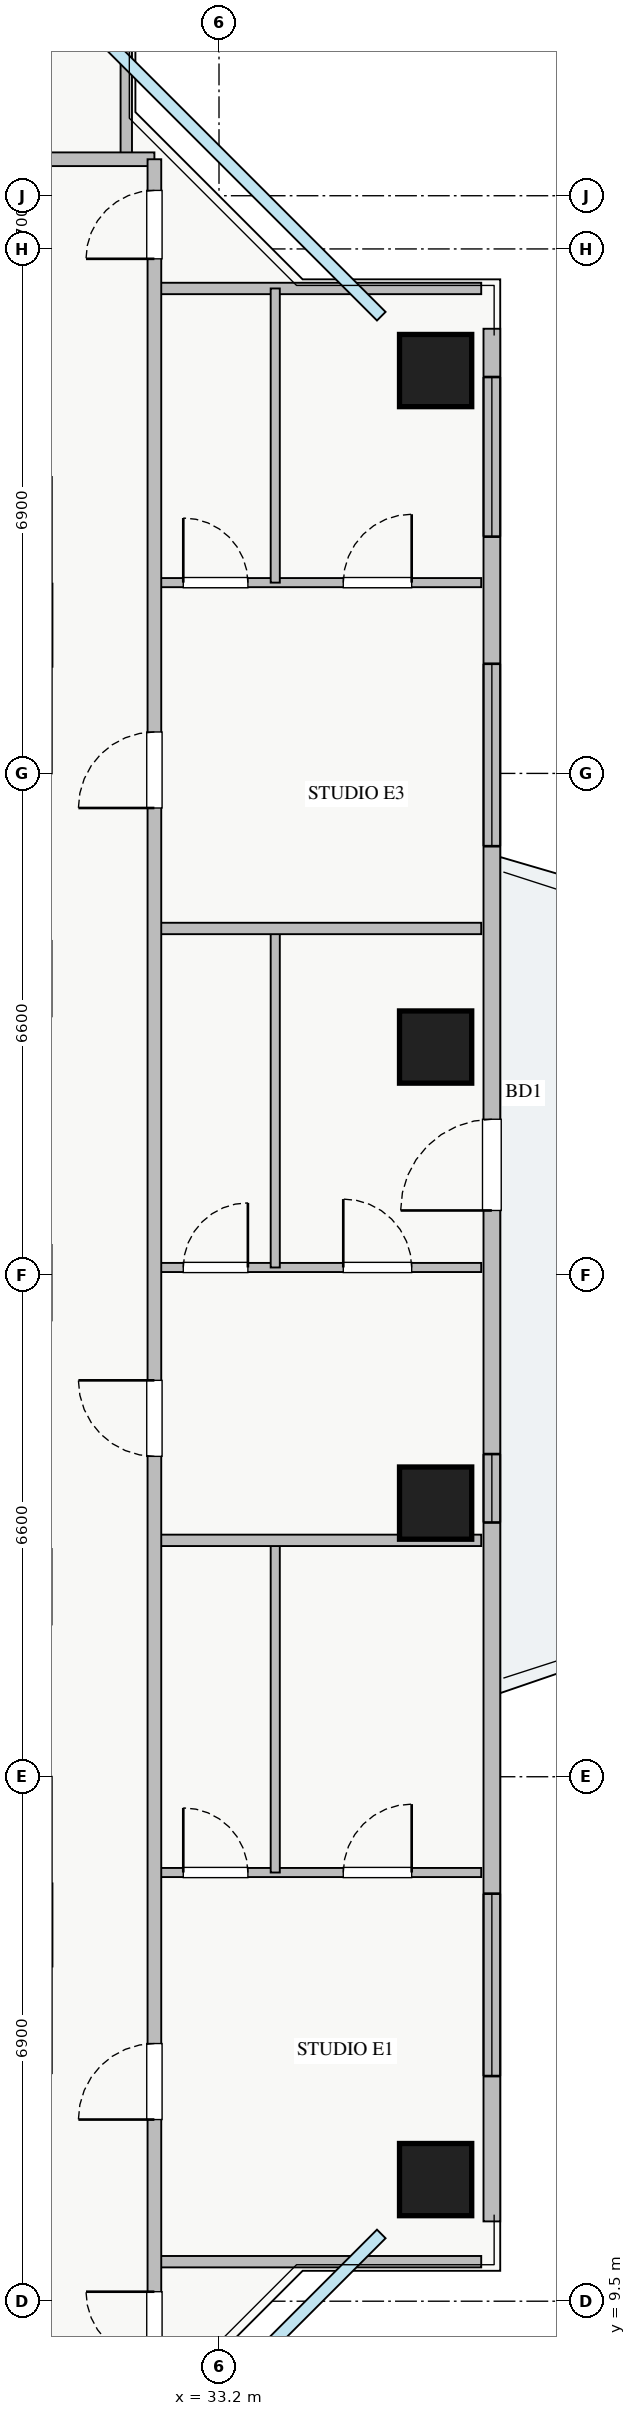
"""IFC4 building model, lengths in metres.
Left out: names, types, materials, properties, quantities, classifications, styles, units other than length and angle.
Written with IfcOpenShell. Run it as: python <this file> out.ifc"""

import sys

from ifc_helpers import new_model, si_unit, direction, frame, frame_2d, origin, origin_2d, place, context, subcontext, project, spatial, rectangle, extrude, source, transform, mapped, element, fill, save


model = new_model("IFC4")
c1 = context("Model", 3, precision=1e-05, world=origin(), true_north=direction((0.0, 1.0)))
c2 = subcontext(c1, "Body", "Model", "MODEL_VIEW")
j1 = project(units=[si_unit("LENGTHUNIT", "METRE"), si_unit("PLANEANGLEUNIT", "RADIAN")], contexts=[c1])
p1 = place(None, origin())
s1 = spatial("IfcSite", under=j1, at=p1, CompositionType="ELEMENT")
p2 = place(p1, origin())
s2 = spatial("IfcBuilding", under=s1, at=p2, CompositionType="ELEMENT")
p3 = place(p2, frame((0.0, 0.0, 182.75)))
s3 = spatial("IfcBuildingStorey", under=s2, at=p3, CompositionType="ELEMENT", Elevation=182.75)
m1 = source(origin(), c2, "Body", "SweptSolid", [
    extrude(rectangle(XDim=0.95, YDim=0.95, at=origin_2d()), origin(), (0.0, 0.0, 1.0), 3.25),
])
for number, where, z_axis, x_axis in (
    (1, (36.05, 11.1, 0.0), (0.0, 0.0, 1.0), (1.0, 0.0, 0.0)),
    (2, (36.05, 20.0, 0.0), (0.0, 0.0, 1.0), (1.0, 0.0, 0.0)),
    (3, (36.05, 26.0, 0.0), (0.0, 0.0, 1.0), (1.0, 0.0, 0.0)),
    (4, (36.05, 34.9, 0.0), (0.0, 0.0, 1.0), (1.0, 0.0, 0.0)),
):
    element("IfcColumn", number, at=place(p3, frame(where, z_axis=z_axis, x_axis=x_axis)), inside=s3, PredefinedType="COLUMN", context=c2, shape_type="MappedRepresentation", body=[
        mapped(m1, transform((0.0, 0.0, 0.0), x_axis=(1.0, 0.0, 0.0), y_axis=(0.0, 1.0, 0.0), z_axis=(0.0, 0.0, 1.0), scale=1.0)),
    ])
p4 = place(p3, frame((36.79, 10.55, 0.0), z_axis=(0.0, 0.0, 1.0), x_axis=(0.0, 1.0, 0.0)))
e5 = element("IfcWall", 5, at=p4, inside=s3, PredefinedType="STANDARD", context=c2, shape_type="SweptSolid", body=[
    extrude(rectangle(XDim=24.9, YDim=0.22, at=frame_2d((12.45, 0.0))), origin(), (0.0, 0.0, 1.0), 2.57),
])
p5 = place(p4, frame((13.3, 0.0, 0.0)))
e6 = element("IfcOpeningElement", 6, at=p5, cuts=e5, PredefinedType="OPENING", context=c2, shape_type="SweptSolid", body=[
    extrude(rectangle(XDim=1.2, YDim=2.1, at=frame_2d((0.6, 1.05))), frame((0.0, 0.12, 0.0), z_axis=(0.0, -1.0, 0.0), x_axis=(1.0, 0.0, 0.0)), (0.0, 0.0, 1.0), 0.24),
])
p6 = place(p4, frame((1.912, 0.0, 0.9)))
e7 = element("IfcOpeningElement", 7, at=p6, cuts=e5, PredefinedType="OPENING", context=c2, shape_type="SweptSolid", body=[
    extrude(rectangle(XDim=2.4, YDim=1.48, at=frame_2d((1.2, 0.74))), frame((0.0, 0.12, 0.0), z_axis=(0.0, -1.0, 0.0), x_axis=(1.0, 0.0, 0.0)), (0.0, 0.0, 1.0), 0.24),
])
p7 = place(p4, frame((22.165, 0.0, 0.9)))
e8 = element("IfcOpeningElement", 8, at=p7, cuts=e5, PredefinedType="OPENING", context=c2, shape_type="SweptSolid", body=[
    extrude(rectangle(XDim=2.1, YDim=1.5, at=frame_2d((1.05, 0.75))), frame((0.0, 0.12, 0.0), z_axis=(0.0, -1.0, 0.0), x_axis=(1.0, 0.0, 0.0)), (0.0, 0.0, 1.0), 0.24),
])
p8 = place(p4, frame((18.093, 0.0, 0.9)))
e9 = element("IfcOpeningElement", 9, at=p8, cuts=e5, PredefinedType="OPENING", context=c2, shape_type="SweptSolid", body=[
    extrude(rectangle(XDim=2.4, YDim=1.5, at=frame_2d((1.2, 0.75))), frame((0.0, 0.12, 0.0), z_axis=(0.0, -1.0, 0.0), x_axis=(1.0, 0.0, 0.0)), (0.0, 0.0, 1.0), 0.24),
])
p9 = place(p4, frame((9.195, 0.0, 0.9)))
e10 = element("IfcOpeningElement", 10, at=p9, cuts=e5, PredefinedType="OPENING", context=c2, shape_type="SweptSolid", body=[
    extrude(rectangle(XDim=0.9, YDim=1.2, at=frame_2d((0.45, 0.6))), frame((0.0, 0.12, 0.0), z_axis=(0.0, -1.0, 0.0), x_axis=(1.0, 0.0, 0.0)), (0.0, 0.0, 1.0), 0.24),
])
p10 = place(p3, frame((31.98, 37.68, 0.0), z_axis=(0.0, 0.0, 1.0), x_axis=(0.0, 1.0, 0.0)))
e11 = element("IfcWall", 11, at=p10, inside=s3, PredefinedType="PARTITIONING", context=c2, shape_type="SweptSolid", body=[
    extrude(rectangle(XDim=2.97, YDim=0.15, at=frame_2d((1.485, 0.0))), origin(), (0.0, 0.0, 1.0), 3.03),
])
p11 = place(p3, frame((8.72, 37.68, 0.0), z_axis=(0.0, 0.0, 1.0), x_axis=(1.0, 0.0, 0.0)))
e12 = element("IfcWall", 12, at=p11, inside=s3, PredefinedType="PARTITIONING", context=c2, shape_type="SweptSolid", body=[
    extrude(rectangle(XDim=23.63, YDim=0.18, at=frame_2d((11.815, 0.0))), origin(), (0.0, 0.0, 1.0), 3.03),
])
p12 = place(p11, frame((2.83, 0.0, 0.0)))
e13 = element("IfcOpeningElement", 13, at=p12, cuts=e12, PredefinedType="OPENING", context=c2, shape_type="SweptSolid", body=[
    extrude(rectangle(XDim=1.0, YDim=2.05, at=frame_2d((0.5, 1.025))), frame((0.0, 0.1, 0.0), z_axis=(0.0, -1.0, 0.0), x_axis=(1.0, 0.0, 0.0)), (0.0, 0.0, 1.0), 0.2),
])
p13 = place(p11, frame((8.02, 0.0, 0.0)))
e14 = element("IfcOpeningElement", 14, at=p13, cuts=e12, PredefinedType="OPENING", context=c2, shape_type="SweptSolid", body=[
    extrude(rectangle(XDim=1.0, YDim=2.05, at=frame_2d((0.5, 1.025))), frame((0.0, 0.1, 0.0), z_axis=(0.0, -1.0, 0.0), x_axis=(1.0, 0.0, 0.0)), (0.0, 0.0, 1.0), 0.2),
])
p14 = place(p11, frame((13.41, 0.0, 0.0)))
e15 = element("IfcOpeningElement", 15, at=p14, cuts=e12, PredefinedType="OPENING", context=c2, shape_type="SweptSolid", body=[
    extrude(rectangle(XDim=1.0, YDim=2.05, at=frame_2d((0.5, 1.025))), frame((0.0, 0.1, 0.0), z_axis=(0.0, -1.0, 0.0), x_axis=(1.0, 0.0, 0.0)), (0.0, 0.0, 1.0), 0.2),
])
p15 = place(p11, frame((19.85, 0.0, 0.0)))
e16 = element("IfcOpeningElement", 16, at=p15, cuts=e12, PredefinedType="OPENING", context=c2, shape_type="SweptSolid", body=[
    extrude(rectangle(XDim=1.0, YDim=2.05, at=frame_2d((0.5, 1.025))), frame((0.0, 0.1, 0.0), z_axis=(0.0, -1.0, 0.0), x_axis=(1.0, 0.0, 0.0)), (0.0, 0.0, 1.0), 0.2),
])
for number, where, z_axis, x_axis in (
    (17, (32.35, 35.98, 0.0), (0.0, 0.0, 1.0), (1.0, 0.0, 0.0)),
    (18, (32.35, 10.02, 0.0), (0.0, 0.0, 1.0), (1.0, 0.0, 0.0)),
):
    element("IfcWall", number, at=place(p3, frame(where, z_axis=z_axis, x_axis=x_axis)), inside=s3, PredefinedType="PARTITIONING", context=c2, shape_type="SweptSolid", body=[
        extrude(rectangle(XDim=4.3, YDim=0.15, at=frame_2d((2.15, 0.0))), origin(), (0.0, 0.0, 1.0), 3.03),
    ])
p16 = place(p3, frame((32.35, 15.14, 0.0), z_axis=(0.0, 0.0, 1.0), x_axis=(1.0, 0.0, 0.0)))
e19 = element("IfcWall", 19, at=p16, inside=s3, PredefinedType="PLUMBINGWALL", context=c2, shape_type="SweptSolid", body=[
    extrude(rectangle(XDim=4.3, YDim=0.12, at=frame_2d((2.15, 0.0))), origin(), (0.0, 0.0, 1.0), 3.03),
])
p17 = place(p16, frame((0.38, 0.0, 0.0)))
e20 = element("IfcOpeningElement", 20, at=p17, cuts=e19, PredefinedType="OPENING", context=c2, shape_type="SweptSolid", body=[
    extrude(rectangle(XDim=0.85, YDim=2.05, at=frame_2d((0.425, 1.025))), frame((0.0, 0.07, 0.0), z_axis=(0.0, -1.0, 0.0), x_axis=(1.0, 0.0, 0.0)), (0.0, 0.0, 1.0), 0.14),
])
p18 = place(p16, frame((2.485, 0.0, 0.0)))
e21 = element("IfcOpeningElement", 21, at=p18, cuts=e19, PredefinedType="OPENING", context=c2, shape_type="SweptSolid", body=[
    extrude(rectangle(XDim=0.9, YDim=2.05, at=frame_2d((0.45, 1.025))), frame((0.0, 0.07, 0.0), z_axis=(0.0, -1.0, 0.0), x_axis=(1.0, 0.0, 0.0)), (0.0, 0.0, 1.0), 0.14),
])
p19 = place(p3, frame((33.94, 15.14, 0.0), z_axis=(0.0, 0.0, 1.0), x_axis=(0.0, 1.0, 0.0)))
e22 = element("IfcWall", 22, at=p19, inside=s3, PredefinedType="PLUMBINGWALL", context=c2, shape_type="SweptSolid", body=[
    extrude(rectangle(XDim=4.37, YDim=0.12, at=frame_2d((2.185, 0.0))), origin(), (0.0, 0.0, 1.0), 3.03),
])
p20 = place(p3, frame((32.35, 23.1, 0.0), z_axis=(0.0, 0.0, 1.0), x_axis=(1.0, 0.0, 0.0)))
e23 = element("IfcWall", 23, at=p20, inside=s3, PredefinedType="PLUMBINGWALL", context=c2, shape_type="SweptSolid", body=[
    extrude(rectangle(XDim=4.3, YDim=0.12, at=frame_2d((2.15, 0.0))), origin(), (0.0, 0.0, 1.0), 3.03),
])
p21 = place(p20, frame((0.38, 0.0, 0.0)))
e24 = element("IfcOpeningElement", 24, at=p21, cuts=e23, PredefinedType="OPENING", context=c2, shape_type="SweptSolid", body=[
    extrude(rectangle(XDim=0.85, YDim=2.05, at=frame_2d((0.425, 1.025))), frame((0.0, 0.07, 0.0), z_axis=(0.0, -1.0, 0.0), x_axis=(1.0, 0.0, 0.0)), (0.0, 0.0, 1.0), 0.14),
])
p22 = place(p20, frame((2.485, 0.0, 0.0)))
e25 = element("IfcOpeningElement", 25, at=p22, cuts=e23, PredefinedType="OPENING", context=c2, shape_type="SweptSolid", body=[
    extrude(rectangle(XDim=0.9, YDim=2.05, at=frame_2d((0.45, 1.025))), frame((0.0, 0.07, 0.0), z_axis=(0.0, -1.0, 0.0), x_axis=(1.0, 0.0, 0.0)), (0.0, 0.0, 1.0), 0.14),
])
p23 = place(p3, frame((33.94, 23.1, 0.0), z_axis=(0.0, 0.0, 1.0), x_axis=(0.0, 1.0, 0.0)))
e26 = element("IfcWall", 26, at=p23, inside=s3, PredefinedType="PLUMBINGWALL", context=c2, shape_type="SweptSolid", body=[
    extrude(rectangle(XDim=4.46, YDim=0.12, at=frame_2d((2.23, 0.0))), origin(), (0.0, 0.0, 1.0), 3.03),
])
p24 = place(p3, frame((32.35, 19.51, 0.0), z_axis=(0.0, 0.0, 1.0), x_axis=(1.0, 0.0, 0.0)))
e27 = element("IfcWall", 27, at=p24, inside=s3, PredefinedType="PARTITIONING", context=c2, shape_type="SweptSolid", body=[
    extrude(rectangle(XDim=4.3, YDim=0.15, at=frame_2d((2.15, 0.0))), origin(), (0.0, 0.0, 1.0), 3.03),
])
p25 = place(p3, frame((32.35, 32.11, 0.0), z_axis=(0.0, 0.0, 1.0), x_axis=(1.0, 0.0, 0.0)))
e28 = element("IfcWall", 28, at=p25, inside=s3, PredefinedType="PLUMBINGWALL", context=c2, shape_type="SweptSolid", body=[
    extrude(rectangle(XDim=4.3, YDim=0.12, at=frame_2d((2.15, 0.0))), origin(), (0.0, 0.0, 1.0), 3.03),
])
p26 = place(p25, frame((0.38, 0.0, 0.0)))
e29 = element("IfcOpeningElement", 29, at=p26, cuts=e28, PredefinedType="OPENING", context=c2, shape_type="SweptSolid", body=[
    extrude(rectangle(XDim=0.85, YDim=2.05, at=frame_2d((0.425, 1.025))), frame((0.0, 0.07, 0.0), z_axis=(0.0, -1.0, 0.0), x_axis=(1.0, 0.0, 0.0)), (0.0, 0.0, 1.0), 0.14),
])
p27 = place(p25, frame((2.485, 0.0, 0.0)))
e30 = element("IfcOpeningElement", 30, at=p27, cuts=e28, PredefinedType="OPENING", context=c2, shape_type="SweptSolid", body=[
    extrude(rectangle(XDim=0.9, YDim=2.05, at=frame_2d((0.45, 1.025))), frame((0.0, 0.07, 0.0), z_axis=(0.0, -1.0, 0.0), x_axis=(1.0, 0.0, 0.0)), (0.0, 0.0, 1.0), 0.14),
])
p28 = place(p3, frame((33.94, 32.11, 0.0), z_axis=(0.0, 0.0, 1.0), x_axis=(0.0, 1.0, 0.0)))
e31 = element("IfcWall", 31, at=p28, inside=s3, PredefinedType="PLUMBINGWALL", context=c2, shape_type="SweptSolid", body=[
    extrude(rectangle(XDim=3.87, YDim=0.12, at=frame_2d((1.935, 0.0))), origin(), (0.0, 0.0, 1.0), 3.03),
])
p29 = place(p3, frame((32.35, 27.56, 0.0), z_axis=(0.0, 0.0, 1.0), x_axis=(1.0, 0.0, 0.0)))
e32 = element("IfcWall", 32, at=p29, inside=s3, PredefinedType="PARTITIONING", context=c2, shape_type="SweptSolid", body=[
    extrude(rectangle(XDim=4.3, YDim=0.15, at=frame_2d((2.15, 0.0))), origin(), (0.0, 0.0, 1.0), 3.03),
])
p30 = place(p3, frame((32.35, 8.31, 0.0), z_axis=(0.0, 0.0, 1.0), x_axis=(0.0, 1.0, 0.0)))
e33 = element("IfcWall", 33, at=p30, inside=s3, PredefinedType="PARTITIONING", context=c2, shape_type="SweptSolid", body=[
    extrude(rectangle(XDim=29.37, YDim=0.18, at=frame_2d((14.685, 0.0))), origin(), (0.0, 0.0, 1.0), 3.03),
])
p31 = place(p30, frame((28.06, 0.0, 0.0)))
e34 = element("IfcOpeningElement", 34, at=p31, cuts=e33, PredefinedType="OPENING", context=c2, shape_type="SweptSolid", body=[
    extrude(rectangle(XDim=0.9, YDim=2.05, at=frame_2d((0.45, 1.025))), frame((0.0, 0.1, 0.0), z_axis=(0.0, -1.0, 0.0), x_axis=(1.0, 0.0, 0.0)), (0.0, 0.0, 1.0), 0.2),
])
p32 = place(p30, frame((0.415, 0.0, 0.0)))
e35 = element("IfcOpeningElement", 35, at=p32, cuts=e33, PredefinedType="OPENING", context=c2, shape_type="SweptSolid", body=[
    extrude(rectangle(XDim=0.9, YDim=2.05, at=frame_2d((0.45, 1.025))), frame((0.0, 0.1, 0.0), z_axis=(0.0, -1.0, 0.0), x_axis=(1.0, 0.0, 0.0)), (0.0, 0.0, 1.0), 0.2),
])
p33 = place(p30, frame((3.58, 0.0, 0.0)))
e36 = element("IfcOpeningElement", 36, at=p33, cuts=e33, PredefinedType="OPENING", context=c2, shape_type="SweptSolid", body=[
    extrude(rectangle(XDim=1.0, YDim=2.05, at=frame_2d((0.5, 1.025))), frame((0.0, 0.1, 0.0), z_axis=(0.0, -1.0, 0.0), x_axis=(1.0, 0.0, 0.0)), (0.0, 0.0, 1.0), 0.2),
])
p34 = place(p30, frame((12.305, 0.0, 0.0)))
e37 = element("IfcOpeningElement", 37, at=p34, cuts=e33, PredefinedType="OPENING", context=c2, shape_type="SweptSolid", body=[
    extrude(rectangle(XDim=1.0, YDim=2.05, at=frame_2d((0.5, 1.025))), frame((0.0, 0.1, 0.0), z_axis=(0.0, -1.0, 0.0), x_axis=(1.0, 0.0, 0.0)), (0.0, 0.0, 1.0), 0.2),
])
p35 = place(p30, frame((20.835, 0.0, 0.0)))
e38 = element("IfcOpeningElement", 38, at=p35, cuts=e33, PredefinedType="OPENING", context=c2, shape_type="SweptSolid", body=[
    extrude(rectangle(XDim=1.0, YDim=2.05, at=frame_2d((0.5, 1.025))), frame((0.0, 0.1, 0.0), z_axis=(0.0, -1.0, 0.0), x_axis=(1.0, 0.0, 0.0)), (0.0, 0.0, 1.0), 0.2),
])
m2 = source(origin(), c2, "Body", "SweptSolid", [
    extrude(rectangle(XDim=1.2, YDim=2.1, at=frame_2d((0.6, 1.05))), frame((0.0, 0.025, 0.0), z_axis=(0.0, -1.0, 0.0), x_axis=(1.0, 0.0, 0.0)), (0.0, 0.0, 1.0), 0.05),
])
p36 = place(p5, origin())
e39 = element("IfcDoor", 39, at=p36, inside=s3, OperationType="SINGLE_SWING_LEFT", PredefinedType="DOOR", context=c2, shape_type="MappedRepresentation", body=[
    mapped(m2, transform((0.0, 0.0, 0.0), x_axis=(1.0, 0.0, 0.0), y_axis=(0.0, 1.0, 0.0), z_axis=(0.0, 0.0, 1.0), scale=1.0)),
])
fill(e6, e39)
m3 = source(origin(), c2, "Body", "SweptSolid", [
    extrude(rectangle(XDim=2.4, YDim=1.48, at=frame_2d((1.2, 0.74))), frame((0.0, 0.03, 0.0), z_axis=(0.0, -1.0, 0.0), x_axis=(1.0, 0.0, 0.0)), (0.0, 0.0, 1.0), 0.06),
])
p37 = place(p6, origin())
e40 = element("IfcWindow", 40, at=p37, inside=s3, PartitioningType="TRIPLE_PANEL_VERTICAL", PredefinedType="WINDOW", context=c2, shape_type="MappedRepresentation", body=[
    mapped(m3, transform((0.0, 0.0, 0.0), x_axis=(1.0, 0.0, 0.0), y_axis=(0.0, 1.0, 0.0), z_axis=(0.0, 0.0, 1.0), scale=1.0)),
])
fill(e7, e40)
m4 = source(origin(), c2, "Body", "SweptSolid", [
    extrude(rectangle(XDim=2.1, YDim=1.5, at=frame_2d((1.05, 0.75))), frame((0.0, 0.03, 0.0), z_axis=(0.0, -1.0, 0.0), x_axis=(1.0, 0.0, 0.0)), (0.0, 0.0, 1.0), 0.06),
])
p38 = place(p7, origin())
e41 = element("IfcWindow", 41, at=p38, inside=s3, PartitioningType="TRIPLE_PANEL_VERTICAL", PredefinedType="WINDOW", context=c2, shape_type="MappedRepresentation", body=[
    mapped(m4, transform((0.0, 0.0, 0.0), x_axis=(1.0, 0.0, 0.0), y_axis=(0.0, 1.0, 0.0), z_axis=(0.0, 0.0, 1.0), scale=1.0)),
])
fill(e8, e41)
m5 = source(origin(), c2, "Body", "SweptSolid", [
    extrude(rectangle(XDim=0.85, YDim=2.05, at=frame_2d((0.425, 1.025))), frame((0.0, 0.025, 0.0), z_axis=(0.0, -1.0, 0.0), x_axis=(1.0, 0.0, 0.0)), (0.0, 0.0, 1.0), 0.05),
])
p39 = place(p17, origin())
e42 = element("IfcDoor", 42, at=p39, inside=s3, OperationType="SINGLE_SWING_LEFT", PredefinedType="DOOR", context=c2, shape_type="MappedRepresentation", body=[
    mapped(m5, transform((0.0, 0.0, 0.0), x_axis=(1.0, 0.0, 0.0), y_axis=(0.0, 1.0, 0.0), z_axis=(0.0, 0.0, 1.0), scale=1.0)),
])
fill(e20, e42)
m6 = source(origin(), c2, "Body", "SweptSolid", [
    extrude(rectangle(XDim=0.9, YDim=2.05, at=frame_2d((0.45, 1.025))), frame((0.0, 0.025, 0.0), z_axis=(0.0, -1.0, 0.0), x_axis=(1.0, 0.0, 0.0)), (0.0, 0.0, 1.0), 0.05),
])
p40 = place(p18, origin())
e43 = element("IfcDoor", 43, at=p40, inside=s3, OperationType="SINGLE_SWING_RIGHT", PredefinedType="DOOR", context=c2, shape_type="MappedRepresentation", body=[
    mapped(m6, transform((0.0, 0.0, 0.0), x_axis=(1.0, 0.0, 0.0), y_axis=(0.0, 1.0, 0.0), z_axis=(0.0, 0.0, 1.0), scale=1.0)),
])
fill(e21, e43)
p41 = place(p21, origin())
e44 = element("IfcDoor", 44, at=p41, inside=s3, OperationType="SINGLE_SWING_RIGHT", PredefinedType="DOOR", context=c2, shape_type="MappedRepresentation", body=[
    mapped(m5, transform((0.0, 0.0, 0.0), x_axis=(1.0, 0.0, 0.0), y_axis=(0.0, 1.0, 0.0), z_axis=(0.0, 0.0, 1.0), scale=1.0)),
])
fill(e24, e44)
p42 = place(p22, origin())
e45 = element("IfcDoor", 45, at=p42, inside=s3, OperationType="SINGLE_SWING_LEFT", PredefinedType="DOOR", context=c2, shape_type="MappedRepresentation", body=[
    mapped(m6, transform((0.0, 0.0, 0.0), x_axis=(1.0, 0.0, 0.0), y_axis=(0.0, 1.0, 0.0), z_axis=(0.0, 0.0, 1.0), scale=1.0)),
])
fill(e25, e45)
p43 = place(p26, origin())
e46 = element("IfcDoor", 46, at=p43, inside=s3, OperationType="SINGLE_SWING_LEFT", PredefinedType="DOOR", context=c2, shape_type="MappedRepresentation", body=[
    mapped(m5, transform((0.0, 0.0, 0.0), x_axis=(1.0, 0.0, 0.0), y_axis=(0.0, 1.0, 0.0), z_axis=(0.0, 0.0, 1.0), scale=1.0)),
])
fill(e29, e46)
p44 = place(p27, origin())
e47 = element("IfcDoor", 47, at=p44, inside=s3, OperationType="SINGLE_SWING_RIGHT", PredefinedType="DOOR", context=c2, shape_type="MappedRepresentation", body=[
    mapped(m6, transform((0.0, 0.0, 0.0), x_axis=(1.0, 0.0, 0.0), y_axis=(0.0, 1.0, 0.0), z_axis=(0.0, 0.0, 1.0), scale=1.0)),
])
fill(e30, e47)
p45 = place(p31, origin())
e48 = element("IfcDoor", 48, at=p45, inside=s3, OperationType="SINGLE_SWING_LEFT", PredefinedType="DOOR", context=c2, shape_type="MappedRepresentation", body=[
    mapped(m6, transform((0.0, 0.0, 0.0), x_axis=(1.0, 0.0, 0.0), y_axis=(0.0, 1.0, 0.0), z_axis=(0.0, 0.0, 1.0), scale=1.0)),
])
fill(e34, e48)
p46 = place(p32, origin())
e49 = element("IfcDoor", 49, at=p46, inside=s3, OperationType="SINGLE_SWING_RIGHT", PredefinedType="DOOR", context=c2, shape_type="MappedRepresentation", body=[
    mapped(m6, transform((0.0, 0.0, 0.0), x_axis=(1.0, 0.0, 0.0), y_axis=(0.0, 1.0, 0.0), z_axis=(0.0, 0.0, 1.0), scale=1.0)),
])
fill(e35, e49)
m7 = source(origin(), c2, "Body", "SweptSolid", [
    extrude(rectangle(XDim=1.0, YDim=2.05, at=frame_2d((0.5, 1.025))), frame((0.0, 0.025, 0.0), z_axis=(0.0, -1.0, 0.0), x_axis=(1.0, 0.0, 0.0)), (0.0, 0.0, 1.0), 0.05),
])
p47 = place(p33, origin())
e50 = element("IfcDoor", 50, at=p47, inside=s3, OperationType="SINGLE_SWING_LEFT", PredefinedType="DOOR", context=c2, shape_type="MappedRepresentation", body=[
    mapped(m7, transform((0.0, 0.0, 0.0), x_axis=(1.0, 0.0, 0.0), y_axis=(0.0, 1.0, 0.0), z_axis=(0.0, 0.0, 1.0), scale=1.0)),
])
fill(e36, e50)
p48 = place(p34, origin())
e51 = element("IfcDoor", 51, at=p48, inside=s3, OperationType="SINGLE_SWING_RIGHT", PredefinedType="DOOR", context=c2, shape_type="MappedRepresentation", body=[
    mapped(m7, transform((0.0, 0.0, 0.0), x_axis=(1.0, 0.0, 0.0), y_axis=(0.0, 1.0, 0.0), z_axis=(0.0, 0.0, 1.0), scale=1.0)),
])
fill(e37, e51)
p49 = place(p35, origin())
e52 = element("IfcDoor", 52, at=p49, inside=s3, OperationType="SINGLE_SWING_LEFT", PredefinedType="DOOR", context=c2, shape_type="MappedRepresentation", body=[
    mapped(m7, transform((0.0, 0.0, 0.0), x_axis=(1.0, 0.0, 0.0), y_axis=(0.0, 1.0, 0.0), z_axis=(0.0, 0.0, 1.0), scale=1.0)),
])
fill(e38, e52)
m8 = source(origin(), c2, "Body", "SweptSolid", [
    extrude(rectangle(XDim=2.4, YDim=1.5, at=frame_2d((1.2, 0.75))), frame((0.0, 0.03, 0.0), z_axis=(0.0, -1.0, 0.0), x_axis=(1.0, 0.0, 0.0)), (0.0, 0.0, 1.0), 0.06),
])
p50 = place(p8, origin())
e53 = element("IfcWindow", 53, at=p50, inside=s3, PartitioningType="TRIPLE_PANEL_VERTICAL", PredefinedType="WINDOW", context=c2, shape_type="MappedRepresentation", body=[
    mapped(m8, transform((0.0, 0.0, 0.0), x_axis=(1.0, 0.0, 0.0), y_axis=(0.0, 1.0, 0.0), z_axis=(0.0, 0.0, 1.0), scale=1.0)),
])
fill(e9, e53)
m9 = source(origin(), c2, "Body", "SweptSolid", [
    extrude(rectangle(XDim=0.9, YDim=1.2, at=frame_2d((0.45, 0.6))), frame((0.0, 0.03, 0.0), z_axis=(0.0, -1.0, 0.0), x_axis=(1.0, 0.0, 0.0)), (0.0, 0.0, 1.0), 0.06),
])
p51 = place(p9, origin())
e54 = element("IfcWindow", 54, at=p51, inside=s3, PartitioningType="SINGLE_PANEL", PredefinedType="WINDOW", context=c2, shape_type="MappedRepresentation", body=[
    mapped(m9, transform((0.0, 0.0, 0.0), x_axis=(1.0, 0.0, 0.0), y_axis=(0.0, 1.0, 0.0), z_axis=(0.0, 0.0, 1.0), scale=1.0)),
])
fill(e10, e54)
save(model, sys.argv[1])
